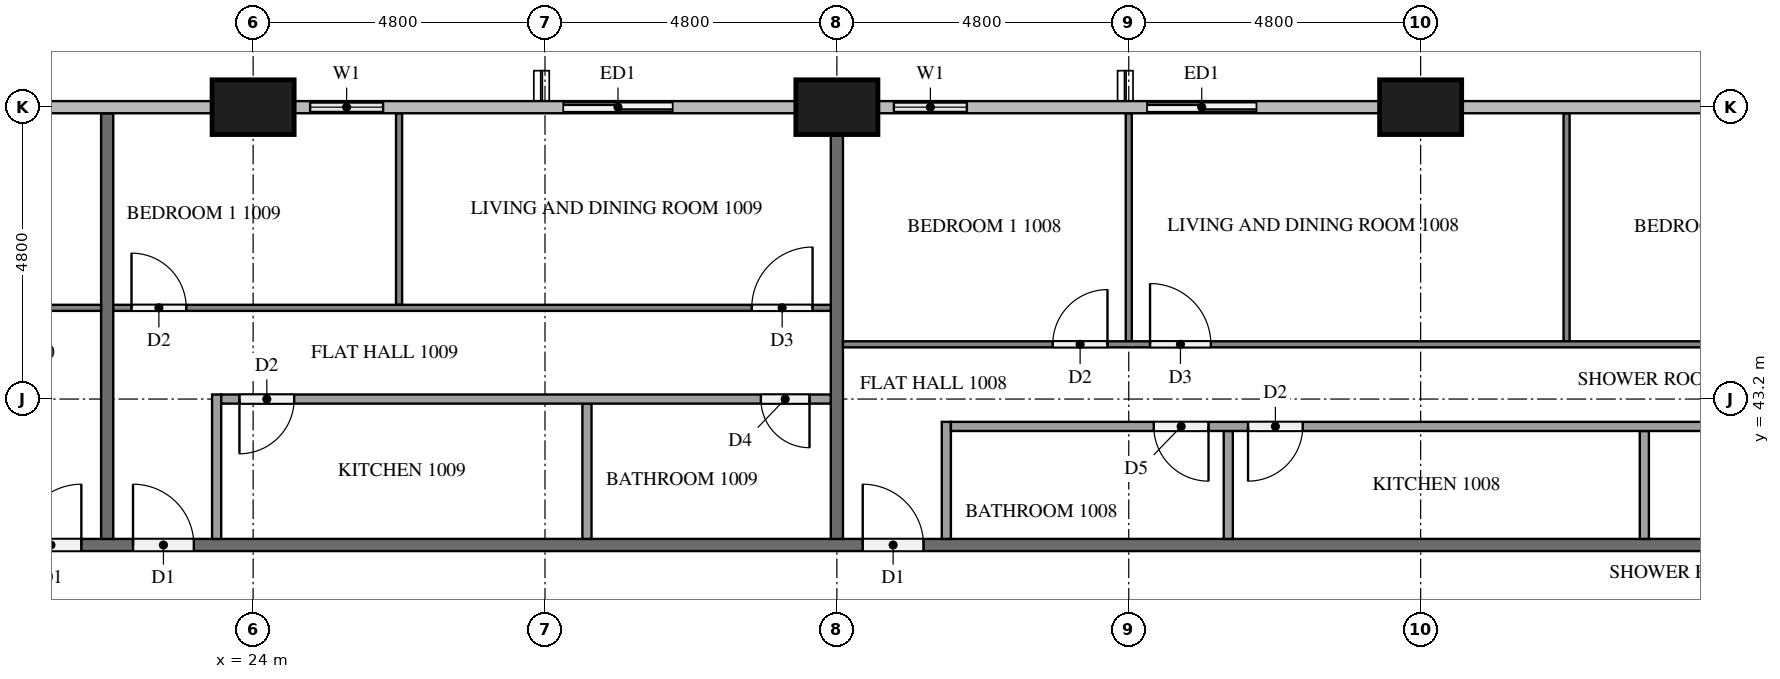
"""IFC4 building model, lengths in metres.
Left out: names, types, materials, properties, quantities, classifications, styles, units other than length and angle.
Written with IfcOpenShell. Run it as: python <this file> out.ifc"""

import sys

from ifc_helpers import new_model, si_unit, direction, frame, frame_2d, origin, origin_2d, place, context, subcontext, project, spatial, rectangle, extrude, element, fill, save


model = new_model("IFC4")
c1 = context("Model", 3, precision=1e-05, world=origin(), true_north=direction((0.0, 1.0)))
c2 = subcontext(c1, "Body", "Model", "MODEL_VIEW")
j1 = project(units=[si_unit("LENGTHUNIT", "METRE"), si_unit("PLANEANGLEUNIT", "RADIAN")], contexts=[c1])
p1 = place(None, origin())
s1 = spatial("IfcSite", under=j1, at=p1, CompositionType="ELEMENT")
p2 = place(p1, origin())
s2 = spatial("IfcBuilding", under=s1, at=p2, CompositionType="ELEMENT")
p3 = place(p2, frame((0.0, 0.0, 43.4)))
s3 = spatial("IfcBuildingStorey", under=s2, at=p3, CompositionType="ELEMENT", Elevation=43.4)
for number, where, z_axis, x_axis in (
    (1, (43.2, 48.0, 0.0), (0.0, 0.0, 1.0), (1.0, 0.0, 0.0)),
    (2, (33.6, 48.0, 0.0), (0.0, 0.0, 1.0), (1.0, 0.0, 0.0)),
    (3, (24.0, 48.0, 0.0), (0.0, 0.0, 1.0), (1.0, 0.0, 0.0)),
):
    element("IfcColumn", number, at=place(p3, frame(where, z_axis=z_axis, x_axis=x_axis)), inside=s3, PredefinedType="COLUMN", context=c2, shape_type="SweptSolid", body=[
        extrude(rectangle(XDim=1.35, YDim=0.9, at=origin_2d()), origin(), (0.0, 0.0, 1.0), 3.2),
    ])
p4 = place(p3, frame((40.8, 48.0, 0.0), z_axis=(0.0, 0.0, 1.0), x_axis=(-1.0, 0.0, 0.0)))
e4 = element("IfcWall", 4, at=p4, inside=s3, PredefinedType="SOLIDWALL", context=c2, shape_type="SweptSolid", body=[
    extrude(rectangle(XDim=2.4, YDim=0.15, at=frame_2d((1.2, 0.0))), origin(), (0.0, 0.0, 1.0), 3.2),
])
p5 = place(p4, frame((0.3, 0.0, 0.0)))
e5 = element("IfcOpeningElement", 5, at=p5, cuts=e4, PredefinedType="OPENING", context=c2, shape_type="SweptSolid", body=[
    extrude(rectangle(XDim=1.8, YDim=2.4, at=frame_2d((0.9, 1.2))), frame((0.0, 0.085, 0.0), z_axis=(0.0, -1.0, 0.0), x_axis=(1.0, 0.0, 0.0)), (0.0, 0.0, 1.0), 0.17),
])
p6 = place(p3, frame((36.0, 48.0, 0.0), z_axis=(0.0, 0.0, 1.0), x_axis=(-1.0, 0.0, 0.0)))
e6 = element("IfcWall", 6, at=p6, inside=s3, PredefinedType="SOLIDWALL", context=c2, shape_type="SweptSolid", body=[
    extrude(rectangle(XDim=1.725, YDim=0.15, at=frame_2d((0.863, 0.0))), origin(), (0.0, 0.0, 1.0), 3.2),
])
p7 = place(p6, frame((0.262, 0.0, 0.9)))
e7 = element("IfcOpeningElement", 7, at=p7, cuts=e6, PredefinedType="OPENING", context=c2, shape_type="SweptSolid", body=[
    extrude(rectangle(XDim=1.2, YDim=1.4, at=frame_2d((0.6, 0.7))), frame((0.0, 0.085, 0.0), z_axis=(0.0, -1.0, 0.0), x_axis=(1.0, 0.0, 0.0)), (0.0, 0.0, 1.0), 0.17),
])
p8 = place(p3, frame((31.2, 48.0, 0.0), z_axis=(0.0, 0.0, 1.0), x_axis=(-1.0, 0.0, 0.0)))
e8 = element("IfcWall", 8, at=p8, inside=s3, PredefinedType="SOLIDWALL", context=c2, shape_type="SweptSolid", body=[
    extrude(rectangle(XDim=2.4, YDim=0.15, at=frame_2d((1.2, 0.0))), origin(), (0.0, 0.0, 1.0), 3.2),
])
p9 = place(p8, frame((0.3, 0.0, 0.0)))
e9 = element("IfcOpeningElement", 9, at=p9, cuts=e8, PredefinedType="OPENING", context=c2, shape_type="SweptSolid", body=[
    extrude(rectangle(XDim=1.8, YDim=2.4, at=frame_2d((0.9, 1.2))), frame((0.0, 0.085, 0.0), z_axis=(0.0, -1.0, 0.0), x_axis=(1.0, 0.0, 0.0)), (0.0, 0.0, 1.0), 0.17),
])
p10 = place(p3, frame((26.4, 48.0, 0.0), z_axis=(0.0, 0.0, 1.0), x_axis=(-1.0, 0.0, 0.0)))
e10 = element("IfcWall", 10, at=p10, inside=s3, PredefinedType="SOLIDWALL", context=c2, shape_type="SweptSolid", body=[
    extrude(rectangle(XDim=1.725, YDim=0.15, at=frame_2d((0.862, 0.0))), origin(), (0.0, 0.0, 1.0), 3.2),
])
p11 = place(p10, frame((0.262, 0.0, 0.9)))
e11 = element("IfcOpeningElement", 11, at=p11, cuts=e10, PredefinedType="OPENING", context=c2, shape_type="SweptSolid", body=[
    extrude(rectangle(XDim=1.2, YDim=1.4, at=frame_2d((0.6, 0.7))), frame((0.0, 0.085, 0.0), z_axis=(0.0, -1.0, 0.0), x_axis=(1.0, 0.0, 0.0)), (0.0, 0.0, 1.0), 0.17),
])
p12 = place(p3, frame((11.9, 40.8, 0.0), z_axis=(0.0, 0.0, 1.0), x_axis=(1.0, 0.0, 0.0)))
e12 = element("IfcWall", 12, at=p12, inside=s3, PredefinedType="PARTITIONING", context=c2, shape_type="SweptSolid", body=[
    extrude(rectangle(XDim=38.6, YDim=0.2, at=frame_2d((19.3, 0.0))), origin(), (0.0, 0.0, 1.0), 3.2),
])
p13 = place(p12, frame((22.125, 0.0, 0.0)))
e13 = element("IfcOpeningElement", 13, at=p13, cuts=e12, PredefinedType="OPENING", context=c2, shape_type="SweptSolid", body=[
    extrude(rectangle(XDim=1.0, YDim=2.1, at=frame_2d((0.5, 1.05))), frame((0.0, 0.11, 0.0), z_axis=(0.0, -1.0, 0.0), x_axis=(1.0, 0.0, 0.0)), (0.0, 0.0, 1.0), 0.22),
])
p14 = place(p12, frame((10.125, 0.0, 0.0)))
e14 = element("IfcOpeningElement", 14, at=p14, cuts=e12, PredefinedType="OPENING", context=c2, shape_type="SweptSolid", body=[
    extrude(rectangle(XDim=1.0, YDim=2.1, at=frame_2d((0.5, 1.05))), frame((0.0, 0.11, 0.0), z_axis=(0.0, -1.0, 0.0), x_axis=(1.0, 0.0, 0.0)), (0.0, 0.0, 1.0), 0.22),
])
p15 = place(p12, frame((8.275, 0.0, 0.0)))
e15 = element("IfcOpeningElement", 15, at=p15, cuts=e12, PredefinedType="OPENING", context=c2, shape_type="SweptSolid", body=[
    extrude(rectangle(XDim=1.0, YDim=2.1, at=frame_2d((0.5, 1.05))), frame((0.0, 0.11, 0.0), z_axis=(0.0, -1.0, 0.0), x_axis=(1.0, 0.0, 0.0)), (0.0, 0.0, 1.0), 0.22),
])
p16 = place(p3, frame((33.6, 47.55, 0.0), z_axis=(0.0, 0.0, 1.0), x_axis=(0.0, -1.0, 0.0)))
e16 = element("IfcWall", 16, at=p16, inside=s3, PredefinedType="PARTITIONING", context=c2, shape_type="SweptSolid", body=[
    extrude(rectangle(XDim=6.65, YDim=0.2, at=frame_2d((3.325, 0.0))), origin(), (0.0, 0.0, 1.0), 3.2),
])
p17 = place(p3, frame((21.6, 47.9, 0.0), z_axis=(0.0, 0.0, 1.0), x_axis=(0.0, -1.0, 0.0)))
e17 = element("IfcWall", 17, at=p17, inside=s3, PredefinedType="PARTITIONING", context=c2, shape_type="SweptSolid", body=[
    extrude(rectangle(XDim=7.0, YDim=0.2, at=frame_2d((3.5, 0.0))), origin(), (0.0, 0.0, 1.0), 3.2),
])
for number, where, z_axis, x_axis in (
    (18, (38.4, 44.15, 0.0), (0.0, 0.0, 1.0), (0.0, 1.0, 0.0)),
    (19, (45.6, 44.15, 0.0), (0.0, 0.0, 1.0), (0.0, 1.0, 0.0)),
):
    element("IfcWall", number, at=place(p3, frame(where, z_axis=z_axis, x_axis=x_axis)), inside=s3, PredefinedType="PARTITIONING", context=c2, shape_type="SweptSolid", body=[
        extrude(rectangle(XDim=3.75, YDim=0.1, at=frame_2d((1.875, 0.0))), origin(), (0.0, 0.0, 1.0), 3.2),
    ])
p18 = place(p3, frame((33.7, 44.1, 0.0), z_axis=(0.0, 0.0, 1.0), x_axis=(1.0, 0.0, 0.0)))
e20 = element("IfcWall", 20, at=p18, inside=s3, PredefinedType="PARTITIONING", context=c2, shape_type="SweptSolid", body=[
    extrude(rectangle(XDim=16.6, YDim=0.1, at=frame_2d((8.3, 0.0))), origin(), (0.0, 0.0, 1.0), 3.2),
])
p19 = place(p18, frame((3.45, 0.0, 0.0)))
e21 = element("IfcOpeningElement", 21, at=p19, cuts=e20, PredefinedType="OPENING", context=c2, shape_type="SweptSolid", body=[
    extrude(rectangle(XDim=0.9, YDim=2.1, at=frame_2d((0.45, 1.05))), frame((0.0, 0.06, 0.0), z_axis=(0.0, -1.0, 0.0), x_axis=(1.0, 0.0, 0.0)), (0.0, 0.0, 1.0), 0.12),
])
p20 = place(p18, frame((5.05, 0.0, 0.0)))
e22 = element("IfcOpeningElement", 22, at=p20, cuts=e20, PredefinedType="OPENING", context=c2, shape_type="SweptSolid", body=[
    extrude(rectangle(XDim=1.0, YDim=2.1, at=frame_2d((0.5, 1.05))), frame((0.0, 0.06, 0.0), z_axis=(0.0, -1.0, 0.0), x_axis=(1.0, 0.0, 0.0)), (0.0, 0.0, 1.0), 0.12),
])
p21 = place(p18, frame((15.4, 0.0, 0.0)))
e23 = element("IfcOpeningElement", 23, at=p21, cuts=e20, PredefinedType="OPENING", context=c2, shape_type="SweptSolid", body=[
    extrude(rectangle(XDim=0.9, YDim=2.1, at=frame_2d((0.45, 1.05))), frame((0.0, 0.06, 0.0), z_axis=(0.0, -1.0, 0.0), x_axis=(1.0, 0.0, 0.0)), (0.0, 0.0, 1.0), 0.12),
])
for number, where, z_axis, x_axis in (
    (24, (40.037, 40.9, 0.0), (0.0, 0.0, 1.0), (0.0, 1.0, 0.0)),
    (25, (46.879, 40.9, 0.0), (0.0, 0.0, 1.0), (0.0, 1.0, 0.0)),
):
    element("IfcWall", number, at=place(p3, frame(where, z_axis=z_axis, x_axis=x_axis)), inside=s3, PredefinedType="PARTITIONING", context=c2, shape_type="SweptSolid", body=[
        extrude(rectangle(XDim=1.775, YDim=0.15, at=frame_2d((0.888, 0.0))), origin(), (0.0, 0.0, 1.0), 3.2),
    ])
p22 = place(p3, frame((35.4, 40.9, 0.0), z_axis=(0.0, 0.0, 1.0), x_axis=(0.0, 1.0, 0.0)))
e26 = element("IfcWall", 26, at=p22, inside=s3, PredefinedType="PARTITIONING", context=c2, shape_type="SweptSolid", body=[
    extrude(rectangle(XDim=1.925, YDim=0.15, at=frame_2d((0.962, 0.0))), origin(), (0.0, 0.0, 1.0), 3.2),
])
p23 = place(p3, frame((50.3, 42.75, 0.0), z_axis=(0.0, 0.0, 1.0), x_axis=(-1.0, 0.0, 0.0)))
e27 = element("IfcWall", 27, at=p23, inside=s3, PredefinedType="PARTITIONING", context=c2, shape_type="SweptSolid", body=[
    extrude(rectangle(XDim=14.825, YDim=0.15, at=frame_2d((7.413, 0.0))), origin(), (0.0, 0.0, 1.0), 3.2),
])
p24 = place(p23, frame((10.588, 0.0, 0.0)))
e28 = element("IfcOpeningElement", 28, at=p24, cuts=e27, PredefinedType="OPENING", context=c2, shape_type="SweptSolid", body=[
    extrude(rectangle(XDim=0.9, YDim=2.1, at=frame_2d((0.45, 1.05))), frame((0.0, 0.085, 0.0), z_axis=(0.0, -1.0, 0.0), x_axis=(1.0, 0.0, 0.0)), (0.0, 0.0, 1.0), 0.17),
])
p25 = place(p23, frame((9.039, 0.0, 0.0)))
e29 = element("IfcOpeningElement", 29, at=p25, cuts=e27, PredefinedType="OPENING", context=c2, shape_type="SweptSolid", body=[
    extrude(rectangle(XDim=0.9, YDim=2.1, at=frame_2d((0.45, 1.05))), frame((0.0, 0.085, 0.0), z_axis=(0.0, -1.0, 0.0), x_axis=(1.0, 0.0, 0.0)), (0.0, 0.0, 1.0), 0.17),
])
p26 = place(p23, frame((0.35, 0.0, 0.0)))
e30 = element("IfcOpeningElement", 30, at=p26, cuts=e27, PredefinedType="OPENING", context=c2, shape_type="SweptSolid", body=[
    extrude(rectangle(XDim=0.8, YDim=2.1, at=frame_2d((0.4, 1.05))), frame((0.0, 0.085, 0.0), z_axis=(0.0, -1.0, 0.0), x_axis=(1.0, 0.0, 0.0)), (0.0, 0.0, 1.0), 0.17),
])
p27 = place(p3, frame((26.4, 44.75, 0.0), z_axis=(0.0, 0.0, 1.0), x_axis=(0.0, 1.0, 0.0)))
e31 = element("IfcWall", 31, at=p27, inside=s3, PredefinedType="PARTITIONING", context=c2, shape_type="SweptSolid", body=[
    extrude(rectangle(XDim=3.15, YDim=0.1, at=frame_2d((1.575, 0.0))), origin(), (0.0, 0.0, 1.0), 3.2),
])
p28 = place(p3, frame((21.7, 44.7, 0.0), z_axis=(0.0, 0.0, 1.0), x_axis=(1.0, 0.0, 0.0)))
e32 = element("IfcWall", 32, at=p28, inside=s3, PredefinedType="PARTITIONING", context=c2, shape_type="SweptSolid", body=[
    extrude(rectangle(XDim=11.8, YDim=0.1, at=frame_2d((5.9, 0.0))), origin(), (0.0, 0.0, 1.0), 3.2),
])
p29 = place(p28, frame((0.3, 0.0, 0.0)))
e33 = element("IfcOpeningElement", 33, at=p29, cuts=e32, PredefinedType="OPENING", context=c2, shape_type="SweptSolid", body=[
    extrude(rectangle(XDim=0.9, YDim=2.1, at=frame_2d((0.45, 1.05))), frame((0.0, 0.06, 0.0), z_axis=(0.0, -1.0, 0.0), x_axis=(1.0, 0.0, 0.0)), (0.0, 0.0, 1.0), 0.12),
])
p30 = place(p28, frame((10.5, 0.0, 0.0)))
e34 = element("IfcOpeningElement", 34, at=p30, cuts=e32, PredefinedType="OPENING", context=c2, shape_type="SweptSolid", body=[
    extrude(rectangle(XDim=1.0, YDim=2.1, at=frame_2d((0.5, 1.05))), frame((0.0, 0.06, 0.0), z_axis=(0.0, -1.0, 0.0), x_axis=(1.0, 0.0, 0.0)), (0.0, 0.0, 1.0), 0.12),
])
p31 = place(p3, frame((29.49, 40.9, 0.0), z_axis=(0.0, 0.0, 1.0), x_axis=(0.0, 1.0, 0.0)))
e35 = element("IfcWall", 35, at=p31, inside=s3, PredefinedType="PARTITIONING", context=c2, shape_type="SweptSolid", body=[
    extrude(rectangle(XDim=2.225, YDim=0.15, at=frame_2d((1.113, 0.0))), origin(), (0.0, 0.0, 1.0), 3.2),
])
p32 = place(p3, frame((23.4, 40.9, 0.0), z_axis=(0.0, 0.0, 1.0), x_axis=(0.0, 1.0, 0.0)))
e36 = element("IfcWall", 36, at=p32, inside=s3, PredefinedType="PARTITIONING", context=c2, shape_type="SweptSolid", body=[
    extrude(rectangle(XDim=2.375, YDim=0.15, at=frame_2d((1.188, 0.0))), origin(), (0.0, 0.0, 1.0), 3.2),
])
p33 = place(p3, frame((33.5, 43.2, 0.0), z_axis=(0.0, 0.0, 1.0), x_axis=(-1.0, 0.0, 0.0)))
e37 = element("IfcWall", 37, at=p33, inside=s3, PredefinedType="PARTITIONING", context=c2, shape_type="SweptSolid", body=[
    extrude(rectangle(XDim=10.025, YDim=0.15, at=frame_2d((5.012, 0.0))), origin(), (0.0, 0.0, 1.0), 3.2),
])
p34 = place(p33, frame((8.825, 0.0, 0.0)))
e38 = element("IfcOpeningElement", 38, at=p34, cuts=e37, PredefinedType="OPENING", context=c2, shape_type="SweptSolid", body=[
    extrude(rectangle(XDim=0.9, YDim=2.1, at=frame_2d((0.45, 1.05))), frame((0.0, 0.085, 0.0), z_axis=(0.0, -1.0, 0.0), x_axis=(1.0, 0.0, 0.0)), (0.0, 0.0, 1.0), 0.17),
])
p35 = place(p33, frame((0.35, 0.0, 0.0)))
e39 = element("IfcOpeningElement", 39, at=p35, cuts=e37, PredefinedType="OPENING", context=c2, shape_type="SweptSolid", body=[
    extrude(rectangle(XDim=0.8, YDim=2.1, at=frame_2d((0.4, 1.05))), frame((0.0, 0.085, 0.0), z_axis=(0.0, -1.0, 0.0), x_axis=(1.0, 0.0, 0.0)), (0.0, 0.0, 1.0), 0.17),
])
p36 = place(p3, frame((12.1, 44.7, 0.0), z_axis=(0.0, 0.0, 1.0), x_axis=(1.0, 0.0, 0.0)))
e40 = element("IfcWall", 40, at=p36, inside=s3, PredefinedType="PARTITIONING", context=c2, shape_type="SweptSolid", body=[
    extrude(rectangle(XDim=9.4, YDim=0.1, at=frame_2d((4.7, 0.0))), origin(), (0.0, 0.0, 1.0), 3.2),
])
p37 = place(p36, frame((5.05, 0.0, 0.0)))
e41 = element("IfcOpeningElement", 41, at=p37, cuts=e40, PredefinedType="OPENING", context=c2, shape_type="SweptSolid", body=[
    extrude(rectangle(XDim=0.9, YDim=2.1, at=frame_2d((0.45, 1.05))), frame((0.0, 0.06, 0.0), z_axis=(0.0, -1.0, 0.0), x_axis=(1.0, 0.0, 0.0)), (0.0, 0.0, 1.0), 0.12),
])
p38 = place(p36, frame((3.35, 0.0, 0.0)))
e42 = element("IfcOpeningElement", 42, at=p38, cuts=e40, PredefinedType="OPENING", context=c2, shape_type="SweptSolid", body=[
    extrude(rectangle(XDim=1.0, YDim=2.1, at=frame_2d((0.5, 1.05))), frame((0.0, 0.06, 0.0), z_axis=(0.0, -1.0, 0.0), x_axis=(1.0, 0.0, 0.0)), (0.0, 0.0, 1.0), 0.12),
])
p39 = place(p5, origin())
e43 = element("IfcDoor", 43, at=p39, inside=s3, OperationType="SLIDING_TO_RIGHT", PredefinedType="DOOR", context=c2, shape_type="SweptSolid", body=[
    extrude(rectangle(XDim=1.8, YDim=2.4, at=frame_2d((0.9, 1.2))), frame((0.0, 0.025, 0.0), z_axis=(0.0, -1.0, 0.0), x_axis=(1.0, 0.0, 0.0)), (0.0, 0.0, 1.0), 0.05),
])
fill(e5, e43)
p40 = place(p7, origin())
e44 = element("IfcWindow", 44, at=p40, inside=s3, PartitioningType="SINGLE_PANEL", PredefinedType="WINDOW", context=c2, shape_type="SweptSolid", body=[
    extrude(rectangle(XDim=1.2, YDim=1.4, at=frame_2d((0.6, 0.7))), frame((0.0, 0.03, 0.0), z_axis=(0.0, -1.0, 0.0), x_axis=(1.0, 0.0, 0.0)), (0.0, 0.0, 1.0), 0.06),
])
fill(e7, e44)
p41 = place(p9, origin())
e45 = element("IfcDoor", 45, at=p41, inside=s3, OperationType="SLIDING_TO_LEFT", PredefinedType="DOOR", context=c2, shape_type="SweptSolid", body=[
    extrude(rectangle(XDim=1.8, YDim=2.4, at=frame_2d((0.9, 1.2))), frame((0.0, 0.025, 0.0), z_axis=(0.0, -1.0, 0.0), x_axis=(1.0, 0.0, 0.0)), (0.0, 0.0, 1.0), 0.05),
])
fill(e9, e45)
p42 = place(p11, origin())
e46 = element("IfcWindow", 46, at=p42, inside=s3, PartitioningType="SINGLE_PANEL", PredefinedType="WINDOW", context=c2, shape_type="SweptSolid", body=[
    extrude(rectangle(XDim=1.2, YDim=1.4, at=frame_2d((0.6, 0.7))), frame((0.0, 0.03, 0.0), z_axis=(0.0, -1.0, 0.0), x_axis=(1.0, 0.0, 0.0)), (0.0, 0.0, 1.0), 0.06),
])
fill(e11, e46)
p43 = place(p13, origin())
e47 = element("IfcDoor", 47, at=p43, inside=s3, OperationType="SINGLE_SWING_LEFT", PredefinedType="DOOR", context=c2, shape_type="SweptSolid", body=[
    extrude(rectangle(XDim=1.0, YDim=2.1, at=frame_2d((0.5, 1.05))), frame((0.0, 0.025, 0.0), z_axis=(0.0, -1.0, 0.0), x_axis=(1.0, 0.0, 0.0)), (0.0, 0.0, 1.0), 0.05),
])
fill(e13, e47)
p44 = place(p14, origin())
e48 = element("IfcDoor", 48, at=p44, inside=s3, OperationType="SINGLE_SWING_LEFT", PredefinedType="DOOR", context=c2, shape_type="SweptSolid", body=[
    extrude(rectangle(XDim=1.0, YDim=2.1, at=frame_2d((0.5, 1.05))), frame((0.0, 0.025, 0.0), z_axis=(0.0, -1.0, 0.0), x_axis=(1.0, 0.0, 0.0)), (0.0, 0.0, 1.0), 0.05),
])
fill(e14, e48)
p45 = place(p15, origin())
e49 = element("IfcDoor", 49, at=p45, inside=s3, OperationType="SINGLE_SWING_RIGHT", PredefinedType="DOOR", context=c2, shape_type="SweptSolid", body=[
    extrude(rectangle(XDim=1.0, YDim=2.1, at=frame_2d((0.5, 1.05))), frame((0.0, 0.025, 0.0), z_axis=(0.0, -1.0, 0.0), x_axis=(1.0, 0.0, 0.0)), (0.0, 0.0, 1.0), 0.05),
])
fill(e15, e49)
p46 = place(p19, origin())
e50 = element("IfcDoor", 50, at=p46, inside=s3, OperationType="SINGLE_SWING_RIGHT", PredefinedType="DOOR", context=c2, shape_type="SweptSolid", body=[
    extrude(rectangle(XDim=0.9, YDim=2.1, at=frame_2d((0.45, 1.05))), frame((0.0, 0.025, 0.0), z_axis=(0.0, -1.0, 0.0), x_axis=(1.0, 0.0, 0.0)), (0.0, 0.0, 1.0), 0.05),
])
fill(e21, e50)
p47 = place(p20, origin())
e51 = element("IfcDoor", 51, at=p47, inside=s3, OperationType="SINGLE_SWING_LEFT", PredefinedType="DOOR", context=c2, shape_type="SweptSolid", body=[
    extrude(rectangle(XDim=1.0, YDim=2.1, at=frame_2d((0.5, 1.05))), frame((0.0, 0.025, 0.0), z_axis=(0.0, -1.0, 0.0), x_axis=(1.0, 0.0, 0.0)), (0.0, 0.0, 1.0), 0.05),
])
fill(e22, e51)
p48 = place(p24, origin())
e52 = element("IfcDoor", 52, at=p48, inside=s3, OperationType="SINGLE_SWING_LEFT", PredefinedType="DOOR", context=c2, shape_type="SweptSolid", body=[
    extrude(rectangle(XDim=0.9, YDim=2.1, at=frame_2d((0.45, 1.05))), frame((0.0, 0.025, 0.0), z_axis=(0.0, -1.0, 0.0), x_axis=(1.0, 0.0, 0.0)), (0.0, 0.0, 1.0), 0.05),
])
fill(e28, e52)
p49 = place(p25, origin())
e53 = element("IfcDoor", 53, at=p49, inside=s3, OperationType="SINGLE_SWING_RIGHT", PredefinedType="DOOR", context=c2, shape_type="SweptSolid", body=[
    extrude(rectangle(XDim=0.9, YDim=2.1, at=frame_2d((0.45, 1.05))), frame((0.0, 0.025, 0.0), z_axis=(0.0, -1.0, 0.0), x_axis=(1.0, 0.0, 0.0)), (0.0, 0.0, 1.0), 0.05),
])
fill(e29, e53)
p50 = place(p29, origin())
e54 = element("IfcDoor", 54, at=p50, inside=s3, OperationType="SINGLE_SWING_LEFT", PredefinedType="DOOR", context=c2, shape_type="SweptSolid", body=[
    extrude(rectangle(XDim=0.9, YDim=2.1, at=frame_2d((0.45, 1.05))), frame((0.0, 0.025, 0.0), z_axis=(0.0, -1.0, 0.0), x_axis=(1.0, 0.0, 0.0)), (0.0, 0.0, 1.0), 0.05),
])
fill(e33, e54)
p51 = place(p30, origin())
e55 = element("IfcDoor", 55, at=p51, inside=s3, OperationType="SINGLE_SWING_RIGHT", PredefinedType="DOOR", context=c2, shape_type="SweptSolid", body=[
    extrude(rectangle(XDim=1.0, YDim=2.1, at=frame_2d((0.5, 1.05))), frame((0.0, 0.025, 0.0), z_axis=(0.0, -1.0, 0.0), x_axis=(1.0, 0.0, 0.0)), (0.0, 0.0, 1.0), 0.05),
])
fill(e34, e55)
p52 = place(p34, origin())
e56 = element("IfcDoor", 56, at=p52, inside=s3, OperationType="SINGLE_SWING_RIGHT", PredefinedType="DOOR", context=c2, shape_type="SweptSolid", body=[
    extrude(rectangle(XDim=0.9, YDim=2.1, at=frame_2d((0.45, 1.05))), frame((0.0, 0.025, 0.0), z_axis=(0.0, -1.0, 0.0), x_axis=(1.0, 0.0, 0.0)), (0.0, 0.0, 1.0), 0.05),
])
fill(e38, e56)
p53 = place(p35, origin())
e57 = element("IfcDoor", 57, at=p53, inside=s3, OperationType="SINGLE_SWING_LEFT", PredefinedType="DOOR", context=c2, shape_type="SweptSolid", body=[
    extrude(rectangle(XDim=0.8, YDim=2.1, at=frame_2d((0.4, 1.05))), frame((0.0, 0.025, 0.0), z_axis=(0.0, -1.0, 0.0), x_axis=(1.0, 0.0, 0.0)), (0.0, 0.0, 1.0), 0.05),
])
fill(e39, e57)
save(model, sys.argv[1])
